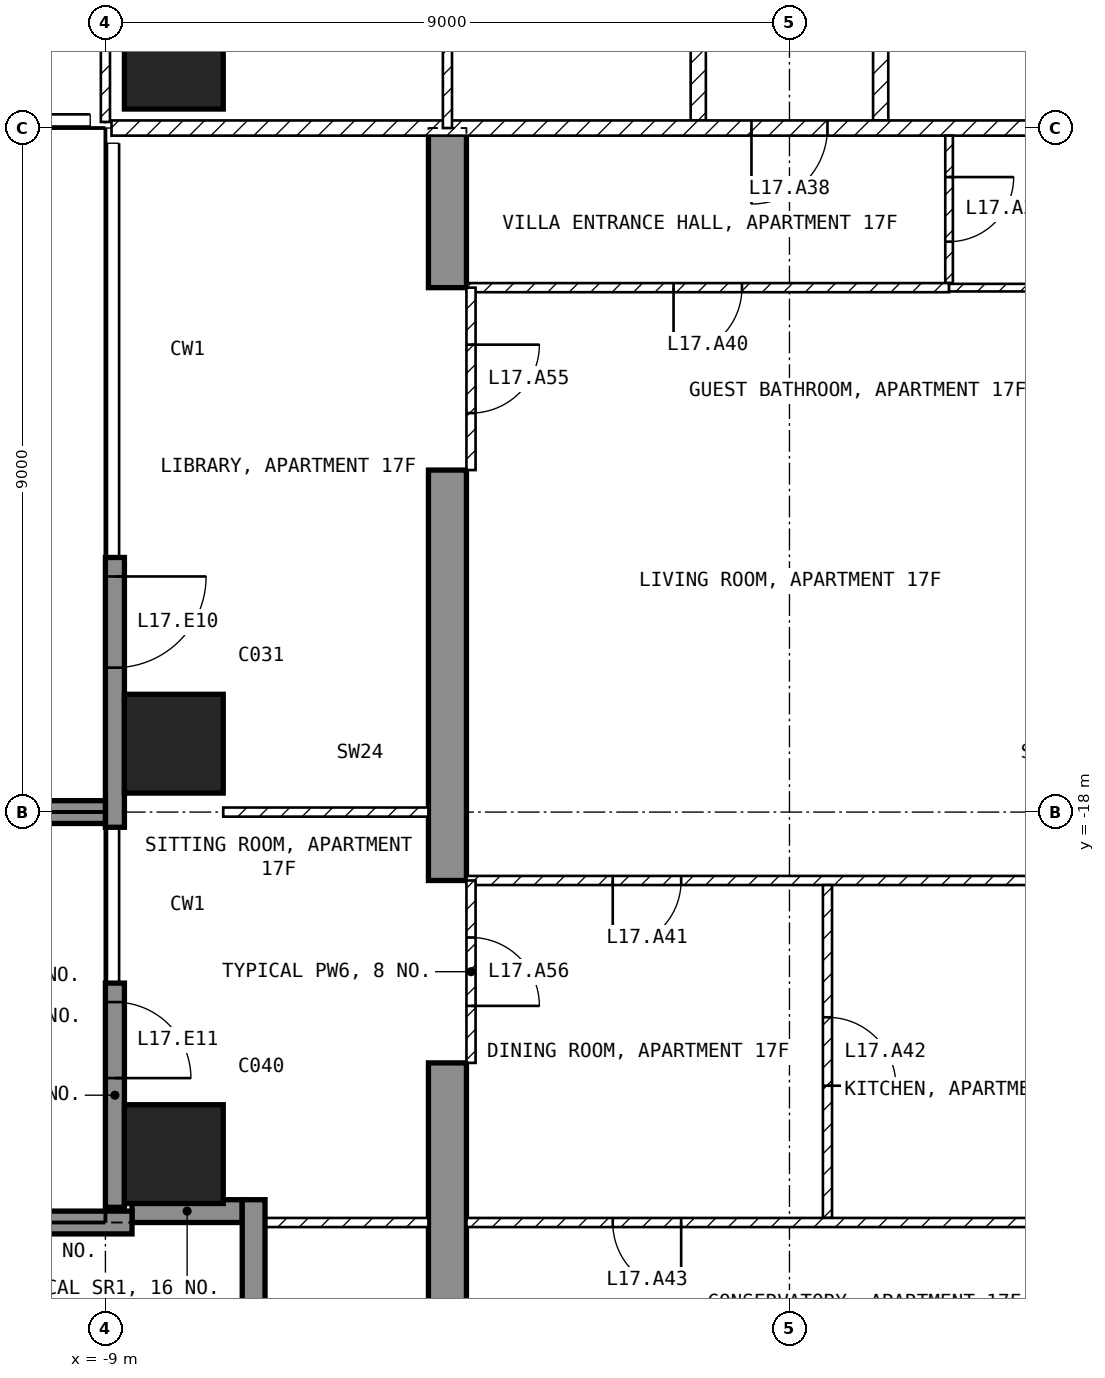
"""IFC4 building model, lengths in metres.
Left out: names, types, materials, properties, quantities, classifications, styles, units other than length and angle.
Written with IfcOpenShell. Run it as: python <this file> out.ifc"""

import sys

from ifc_helpers import new_model, si_unit, direction, frame, frame_2d, origin, origin_2d, place, context, subcontext, project, spatial, polyline, rectangle, outline, extrude, element, fill, save


model = new_model("IFC4")
c1 = context("Model", 3, precision=1e-05, world=origin(), true_north=direction((0.0, 1.0)))
c2 = subcontext(c1, "Body", "Model", "MODEL_VIEW")
j1 = project(units=[si_unit("LENGTHUNIT", "METRE"), si_unit("PLANEANGLEUNIT", "RADIAN")], contexts=[c1])
p1 = place(None, origin())
s1 = spatial("IfcSite", under=j1, at=p1, CompositionType="ELEMENT")
p2 = place(p1, origin())
s2 = spatial("IfcBuilding", under=s1, at=p2, CompositionType="ELEMENT")
p3 = place(p2, frame((0.0, 0.0, 78.5)))
s3 = spatial("IfcBuildingStorey", under=s2, at=p3, CompositionType="ELEMENT", Elevation=78.5)
for number, where, z_axis, x_axis in (
    (1, (-8.1, -22.5, -0.25), (0.0, 0.0, 1.0), (1.0, 0.0, 0.0)),
    (2, (-8.1, -17.1, -0.25), (0.0, 0.0, 1.0), (1.0, 0.0, 0.0)),
    (3, (-8.1, -8.1, -0.25), (0.0, 0.0, 1.0), (1.0, 0.0, 0.0)),
):
    element("IfcColumn", number, at=place(p3, frame(where, z_axis=z_axis, x_axis=x_axis)), inside=s3, PredefinedType="COLUMN", context=c2, shape_type="SweptSolid", body=[
        extrude(rectangle(XDim=1.3, YDim=1.3, at=origin_2d()), origin(), (0.0, 0.0, 1.0), 3.5),
    ])
p4 = place(p3, frame((-4.75, -25.45, -0.25), z_axis=(1.0, 0.0, 0.0), x_axis=(0.0, 1.0, 0.0)))
e4 = element("IfcWall", 4, at=p4, inside=s3, PredefinedType="SHEAR", context=c2, shape_type="SweptSolid", body=[
    extrude(outline(polyline([(0.0, 0.0), (4.15, 0.0), (4.15, 2.65), (6.55, 2.65), (6.55, 0.0), (11.95, 0.0), (11.95, 2.65), (14.35, 2.65), (14.35, 0.0), (16.45, 0.0), (16.45, 3.5), (0.0, 3.5), (0.0, 0.0)])), origin(), (0.0, 0.0, 1.0), 0.5),
])
p5 = place(p3, frame((-8.875, -14.65, 0.0), z_axis=(0.0, 0.0, 1.0), x_axis=(0.0, -1.0, 0.0)))
e5 = element("IfcWall", 5, at=p5, inside=s3, PredefinedType="SOLIDWALL", context=c2, shape_type="SweptSolid", body=[
    extrude(rectangle(XDim=3.55, YDim=0.25, at=frame_2d((1.775, 0.0))), origin(), (0.0, 0.0, 1.0), 3.25),
])
p6 = place(p5, frame((0.25, 0.0, 0.0)))
e6 = element("IfcOpeningElement", 6, at=p6, cuts=e5, PredefinedType="OPENING", context=c2, shape_type="SweptSolid", body=[
    extrude(rectangle(XDim=1.2, YDim=2.4, at=frame_2d((0.6, 1.2))), frame((0.0, 0.135, 0.0), z_axis=(0.0, -1.0, 0.0), x_axis=(1.0, 0.0, 0.0)), (0.0, 0.0, 1.0), 0.27),
])
p7 = place(p3, frame((-8.875, -20.25, 0.0), z_axis=(0.0, 0.0, 1.0), x_axis=(0.0, -1.0, 0.0)))
e7 = element("IfcWall", 7, at=p7, inside=s3, PredefinedType="SOLIDWALL", context=c2, shape_type="SweptSolid", body=[
    extrude(rectangle(XDim=2.95, YDim=0.25, at=frame_2d((1.475, 0.0))), origin(), (0.0, 0.0, 1.0), 3.25),
])
p8 = place(p7, frame((0.25, 0.0, 0.0)))
e8 = element("IfcOpeningElement", 8, at=p8, cuts=e7, PredefinedType="OPENING", context=c2, shape_type="SweptSolid", body=[
    extrude(rectangle(XDim=1.0, YDim=2.4, at=frame_2d((0.5, 1.2))), frame((0.0, 0.135, 0.0), z_axis=(0.0, -1.0, 0.0), x_axis=(1.0, 0.0, 0.0)), (0.0, 0.0, 1.0), 0.27),
])
p9 = place(p3, frame((-8.65, -23.25, 0.0), z_axis=(0.0, 0.0, 1.0), x_axis=(1.0, 0.0, 0.0)))
e9 = element("IfcWall", 9, at=p9, inside=s3, PredefinedType="SOLIDWALL", context=c2, shape_type="SweptSolid", body=[
    extrude(rectangle(XDim=1.45, YDim=0.3, at=frame_2d((0.725, 0.0))), origin(), (0.0, 0.0, 1.0), 3.25),
])
p10 = place(p3, frame((-7.05, -23.1, 0.0), z_axis=(0.0, 0.0, 1.0), x_axis=(0.0, -1.0, 0.0)))
e10 = element("IfcWall", 10, at=p10, inside=s3, PredefinedType="SOLIDWALL", context=c2, shape_type="SweptSolid", body=[
    extrude(rectangle(XDim=1.8, YDim=0.3, at=frame_2d((0.9, 0.0))), origin(), (0.0, 0.0, 1.0), 3.25),
])
p11 = place(p3, frame((-8.65, -23.4, 0.0), z_axis=(0.0, 0.0, 1.0), x_axis=(-1.0, 0.0, 0.0)))
e11 = element("IfcWall", 11, at=p11, inside=s3, PredefinedType="SOLIDWALL", context=c2, shape_type="SweptSolid", body=[
    extrude(rectangle(XDim=3.05, YDim=0.3, at=frame_2d((1.525, 0.0))), origin(), (0.0, 0.0, 1.0), 3.25),
])
p12 = place(p3, frame((-9.0, -18.0, 0.0), z_axis=(0.0, 0.0, 1.0), x_axis=(-1.0, 0.0, 0.0)))
e12 = element("IfcWall", 12, at=p12, inside=s3, PredefinedType="SOLIDWALL", context=c2, shape_type="SweptSolid", body=[
    extrude(rectangle(XDim=2.7, YDim=0.3, at=frame_2d((1.35, 0.0))), origin(), (0.0, 0.0, 1.0), 3.25),
])
for number, where, z_axis, x_axis in (
    (13, (1.2, -1.3, 0.0), (0.0, 0.0, 1.0), (0.0, -1.0, 0.0)),
    (14, (-1.2, -8.9, 0.0), (0.0, 0.0, 1.0), (0.0, 1.0, 0.0)),
):
    element("IfcWall", number, at=place(p3, frame(where, z_axis=z_axis, x_axis=x_axis)), inside=s3, PredefinedType="PARTITIONING", context=c2, shape_type="SweptSolid", body=[
        extrude(rectangle(XDim=7.6, YDim=0.2, at=frame_2d((3.8, 0.0))), origin(), (0.0, 0.0, 1.0), 3.25),
    ])
p13 = place(p3, frame((8.92, -9.0, 0.0), z_axis=(0.0, 0.0, 1.0), x_axis=(-1.0, 0.0, 0.0)))
e15 = element("IfcWall", 15, at=p13, inside=s3, PredefinedType="PARTITIONING", context=c2, shape_type="SweptSolid", body=[
    extrude(rectangle(XDim=17.84, YDim=0.2, at=frame_2d((8.92, 0.0))), origin(), (0.0, 0.0, 1.0), 3.25),
])
p14 = place(p13, frame((8.42, 0.0, 0.0)))
e16 = element("IfcOpeningElement", 16, at=p14, cuts=e15, PredefinedType="OPENING", context=c2, shape_type="SweptSolid", body=[
    extrude(rectangle(XDim=1.0, YDim=2.1, at=frame_2d((0.5, 1.05))), frame((0.0, 0.11, 0.0), z_axis=(0.0, -1.0, 0.0), x_axis=(1.0, 0.0, 0.0)), (0.0, 0.0, 1.0), 0.22),
])
p15 = place(p3, frame((-9.0, -1.3, 0.0), z_axis=(0.0, 0.0, 1.0), x_axis=(0.0, -1.0, 0.0)))
e17 = element("IfcWall", 17, at=p15, inside=s3, PredefinedType="PARTITIONING", context=c2, shape_type="SweptSolid", body=[
    extrude(rectangle(XDim=7.62, YDim=0.12, at=frame_2d((3.81, 0.0))), origin(), (0.0, 0.0, 1.0), 3.25),
])
p16 = place(p15, frame((4.05, 0.0, 0.0)))
e18 = element("IfcOpeningElement", 18, at=p16, cuts=e17, PredefinedType="OPENING", context=c2, shape_type="SweptSolid", body=[
    extrude(rectangle(XDim=0.9, YDim=2.1, at=frame_2d((0.45, 1.05))), frame((0.0, 0.07, 0.0), z_axis=(0.0, -1.0, 0.0), x_axis=(1.0, 0.0, 0.0)), (0.0, 0.0, 1.0), 0.14),
])
p17 = place(p3, frame((-4.5, -1.3, 0.0), z_axis=(0.0, 0.0, 1.0), x_axis=(0.0, -1.0, 0.0)))
e19 = element("IfcWall", 19, at=p17, inside=s3, PredefinedType="PARTITIONING", context=c2, shape_type="SweptSolid", body=[
    extrude(rectangle(XDim=7.7, YDim=0.12, at=frame_2d((3.85, 0.0))), origin(), (0.0, 0.0, 1.0), 3.25),
])
p18 = place(p17, frame((3.4, 0.0, 0.0)))
e20 = element("IfcOpeningElement", 20, at=p18, cuts=e19, PredefinedType="OPENING", context=c2, shape_type="SweptSolid", body=[
    extrude(rectangle(XDim=0.9, YDim=2.1, at=frame_2d((0.45, 1.05))), frame((0.0, 0.07, 0.0), z_axis=(0.0, -1.0, 0.0), x_axis=(1.0, 0.0, 0.0)), (0.0, 0.0, 1.0), 0.14),
])
p19 = place(p3, frame((2.1, -9.1, 0.0), z_axis=(0.0, 0.0, 1.0), x_axis=(0.0, -1.0, 0.0)))
e21 = element("IfcWall", 21, at=p19, inside=s3, PredefinedType="PARTITIONING", context=c2, shape_type="SweptSolid", body=[
    extrude(rectangle(XDim=1.94, YDim=0.1, at=frame_2d((0.97, 0.0))), origin(), (0.0, 0.0, 1.0), 3.25),
])
p20 = place(p19, frame((0.545, 0.0, 0.0)))
e22 = element("IfcOpeningElement", 22, at=p20, cuts=e21, PredefinedType="OPENING", context=c2, shape_type="SweptSolid", body=[
    extrude(rectangle(XDim=0.85, YDim=2.1, at=frame_2d((0.425, 1.05))), frame((0.0, 0.06, 0.0), z_axis=(0.0, -1.0, 0.0), x_axis=(1.0, 0.0, 0.0)), (0.0, 0.0, 1.0), 0.12),
])
p21 = place(p3, frame((2.1, -11.1, 0.0), z_axis=(0.0, 0.0, 1.0), x_axis=(-1.0, 0.0, 0.0)))
e23 = element("IfcWall", 23, at=p21, inside=s3, PredefinedType="PARTITIONING", context=c2, shape_type="SweptSolid", body=[
    extrude(rectangle(XDim=6.35, YDim=0.12, at=frame_2d((3.175, 0.0))), origin(), (0.0, 0.0, 1.0), 3.25),
])
p22 = place(p21, frame((2.725, 0.0, 0.0)))
e24 = element("IfcOpeningElement", 24, at=p22, cuts=e23, PredefinedType="OPENING", context=c2, shape_type="SweptSolid", body=[
    extrude(rectangle(XDim=0.9, YDim=2.1, at=frame_2d((0.45, 1.05))), frame((0.0, 0.07, 0.0), z_axis=(0.0, -1.0, 0.0), x_axis=(1.0, 0.0, 0.0)), (0.0, 0.0, 1.0), 0.14),
])
p23 = place(p3, frame((4.25, -11.1, 0.0), z_axis=(0.0, 0.0, 1.0), x_axis=(-1.0, 0.0, 0.0)))
e25 = element("IfcWall", 25, at=p23, inside=s3, PredefinedType="PARTITIONING", context=c2, shape_type="SweptSolid", body=[
    extrude(rectangle(XDim=2.15, YDim=0.1, at=frame_2d((1.075, 0.0))), origin(), (0.0, 0.0, 1.0), 3.25),
])
p24 = place(p3, frame((4.25, -18.9, 0.0), z_axis=(0.0, 0.0, 1.0), x_axis=(-1.0, 0.0, 0.0)))
e26 = element("IfcWall", 26, at=p24, inside=s3, PredefinedType="PARTITIONING", context=c2, shape_type="SweptSolid", body=[
    extrude(rectangle(XDim=8.5, YDim=0.12, at=frame_2d((4.25, 0.0))), origin(), (0.0, 0.0, 1.0), 3.25),
])
p25 = place(p24, frame((5.675, 0.0, 0.0)))
e27 = element("IfcOpeningElement", 27, at=p25, cuts=e26, PredefinedType="OPENING", context=c2, shape_type="SweptSolid", body=[
    extrude(rectangle(XDim=0.9, YDim=2.1, at=frame_2d((0.45, 1.05))), frame((0.0, 0.07, 0.0), z_axis=(0.0, -1.0, 0.0), x_axis=(1.0, 0.0, 0.0)), (0.0, 0.0, 1.0), 0.14),
])
p26 = place(p3, frame((0.5, -18.96, 0.0), z_axis=(0.0, 0.0, 1.0), x_axis=(0.0, -1.0, 0.0)))
e28 = element("IfcWall", 28, at=p26, inside=s3, PredefinedType="PARTITIONING", context=c2, shape_type="SweptSolid", body=[
    extrude(rectangle(XDim=4.38, YDim=0.12, at=frame_2d((2.19, 0.0))), origin(), (0.0, 0.0, 1.0), 3.25),
])
p27 = place(p26, frame((1.74, 0.0, 0.0)))
e29 = element("IfcOpeningElement", 29, at=p27, cuts=e28, PredefinedType="OPENING", context=c2, shape_type="SweptSolid", body=[
    extrude(rectangle(XDim=0.9, YDim=2.1, at=frame_2d((0.45, 1.05))), frame((0.0, 0.07, 0.0), z_axis=(0.0, -1.0, 0.0), x_axis=(1.0, 0.0, 0.0)), (0.0, 0.0, 1.0), 0.14),
])
p28 = place(p3, frame((4.25, -23.4, 0.0), z_axis=(0.0, 0.0, 1.0), x_axis=(-1.0, 0.0, 0.0)))
e30 = element("IfcWall", 30, at=p28, inside=s3, PredefinedType="PARTITIONING", context=c2, shape_type="SweptSolid", body=[
    extrude(rectangle(XDim=8.5, YDim=0.12, at=frame_2d((4.25, 0.0))), origin(), (0.0, 0.0, 1.0), 3.25),
])
p29 = place(p28, frame((5.675, 0.0, 0.0)))
e31 = element("IfcOpeningElement", 31, at=p29, cuts=e30, PredefinedType="OPENING", context=c2, shape_type="SweptSolid", body=[
    extrude(rectangle(XDim=0.9, YDim=2.1, at=frame_2d((0.45, 1.05))), frame((0.0, 0.07, 0.0), z_axis=(0.0, -1.0, 0.0), x_axis=(1.0, 0.0, 0.0)), (0.0, 0.0, 1.0), 0.14),
])
p30 = place(p3, frame((-4.75, -18.0, 0.0), z_axis=(0.0, 0.0, 1.0), x_axis=(-1.0, 0.0, 0.0)))
e32 = element("IfcWall", 32, at=p30, inside=s3, PredefinedType="PARTITIONING", context=c2, shape_type="SweptSolid", body=[
    extrude(rectangle(XDim=2.7, YDim=0.12, at=frame_2d((1.35, 0.0))), origin(), (0.0, 0.0, 1.0), 3.25),
])
p31 = place(p3, frame((-4.75, -23.4, 0.0), z_axis=(0.0, 0.0, 1.0), x_axis=(-1.0, 0.0, 0.0)))
e33 = element("IfcWall", 33, at=p31, inside=s3, PredefinedType="PARTITIONING", context=c2, shape_type="SweptSolid", body=[
    extrude(rectangle(XDim=2.37, YDim=0.12, at=frame_2d((1.185, 0.0))), origin(), (0.0, 0.0, 1.0), 3.25),
])
p32 = place(p3, frame((-4.19, -11.1, 0.0), z_axis=(0.0, 0.0, 1.0), x_axis=(0.0, -1.0, 0.0)))
e34 = element("IfcWall", 34, at=p32, inside=s3, PredefinedType="PARTITIONING", context=c2, shape_type="SweptSolid", body=[
    extrude(rectangle(XDim=2.4, YDim=0.12, at=frame_2d((1.2, 0.0))), origin(), (0.0, 0.0, 1.0), 2.4),
])
p33 = place(p32, frame((0.75, 0.0, 0.0)))
e35 = element("IfcOpeningElement", 35, at=p33, cuts=e34, PredefinedType="OPENING", context=c2, shape_type="SweptSolid", body=[
    extrude(rectangle(XDim=0.9, YDim=2.1, at=frame_2d((0.45, 1.05))), frame((0.0, 0.07, 0.0), z_axis=(0.0, -1.0, 0.0), x_axis=(1.0, 0.0, 0.0)), (0.0, 0.0, 1.0), 0.14),
])
p34 = place(p3, frame((-4.19, -18.9, 0.0), z_axis=(0.0, 0.0, 1.0), x_axis=(0.0, -1.0, 0.0)))
e36 = element("IfcWall", 36, at=p34, inside=s3, PredefinedType="PARTITIONING", context=c2, shape_type="SweptSolid", body=[
    extrude(rectangle(XDim=2.4, YDim=0.12, at=frame_2d((1.2, 0.0))), origin(), (0.0, 0.0, 1.0), 2.4),
])
p35 = place(p34, frame((0.75, 0.0, 0.0)))
e37 = element("IfcOpeningElement", 37, at=p35, cuts=e36, PredefinedType="OPENING", context=c2, shape_type="SweptSolid", body=[
    extrude(rectangle(XDim=0.9, YDim=2.1, at=frame_2d((0.45, 1.05))), frame((0.0, 0.07, 0.0), z_axis=(0.0, -1.0, 0.0), x_axis=(1.0, 0.0, 0.0)), (0.0, 0.0, 1.0), 0.14),
])
p36 = place(p6, origin())
e38 = element("IfcDoor", 38, at=p36, inside=s3, OperationType="SINGLE_SWING_LEFT", PredefinedType="DOOR", context=c2, shape_type="SweptSolid", body=[
    extrude(rectangle(XDim=1.2, YDim=2.4, at=frame_2d((0.6, 1.2))), frame((0.0, 0.025, 0.0), z_axis=(0.0, -1.0, 0.0), x_axis=(1.0, 0.0, 0.0)), (0.0, 0.0, 1.0), 0.05),
])
fill(e6, e38)
p37 = place(p8, origin())
e39 = element("IfcDoor", 39, at=p37, inside=s3, OperationType="SINGLE_SWING_RIGHT", PredefinedType="DOOR", context=c2, shape_type="SweptSolid", body=[
    extrude(rectangle(XDim=1.0, YDim=2.4, at=frame_2d((0.5, 1.2))), frame((0.0, 0.025, 0.0), z_axis=(0.0, -1.0, 0.0), x_axis=(1.0, 0.0, 0.0)), (0.0, 0.0, 1.0), 0.05),
])
fill(e8, e39)
p38 = place(p14, origin())
e40 = element("IfcDoor", 40, at=p38, inside=s3, OperationType="SINGLE_SWING_RIGHT", PredefinedType="DOOR", context=c2, shape_type="SweptSolid", body=[
    extrude(rectangle(XDim=1.0, YDim=2.1, at=frame_2d((0.5, 1.05))), frame((0.0, 0.025, 0.0), z_axis=(0.0, -1.0, 0.0), x_axis=(1.0, 0.0, 0.0)), (0.0, 0.0, 1.0), 0.05),
])
fill(e16, e40)
p39 = place(p20, origin())
e41 = element("IfcDoor", 41, at=p39, inside=s3, OperationType="SINGLE_SWING_LEFT", PredefinedType="DOOR", context=c2, shape_type="SweptSolid", body=[
    extrude(rectangle(XDim=0.85, YDim=2.1, at=frame_2d((0.425, 1.05))), frame((0.0, 0.025, 0.0), z_axis=(0.0, -1.0, 0.0), x_axis=(1.0, 0.0, 0.0)), (0.0, 0.0, 1.0), 0.05),
])
fill(e22, e41)
p40 = place(p22, origin())
e42 = element("IfcDoor", 42, at=p40, inside=s3, OperationType="SINGLE_SWING_RIGHT", PredefinedType="DOOR", context=c2, shape_type="SweptSolid", body=[
    extrude(rectangle(XDim=0.9, YDim=2.1, at=frame_2d((0.45, 1.05))), frame((0.0, 0.025, 0.0), z_axis=(0.0, -1.0, 0.0), x_axis=(1.0, 0.0, 0.0)), (0.0, 0.0, 1.0), 0.05),
])
fill(e24, e42)
p41 = place(p25, origin())
e43 = element("IfcDoor", 43, at=p41, inside=s3, OperationType="SINGLE_SWING_RIGHT", PredefinedType="DOOR", context=c2, shape_type="SweptSolid", body=[
    extrude(rectangle(XDim=0.9, YDim=2.1, at=frame_2d((0.45, 1.05))), frame((0.0, 0.025, 0.0), z_axis=(0.0, -1.0, 0.0), x_axis=(1.0, 0.0, 0.0)), (0.0, 0.0, 1.0), 0.05),
])
fill(e27, e43)
p42 = place(p27, origin())
e44 = element("IfcDoor", 44, at=p42, inside=s3, OperationType="SINGLE_SWING_RIGHT", PredefinedType="DOOR", context=c2, shape_type="SweptSolid", body=[
    extrude(rectangle(XDim=0.9, YDim=2.1, at=frame_2d((0.45, 1.05))), frame((0.0, 0.025, 0.0), z_axis=(0.0, -1.0, 0.0), x_axis=(1.0, 0.0, 0.0)), (0.0, 0.0, 1.0), 0.05),
])
fill(e29, e44)
p43 = place(p29, origin())
e45 = element("IfcDoor", 45, at=p43, inside=s3, OperationType="SINGLE_SWING_LEFT", PredefinedType="DOOR", context=c2, shape_type="SweptSolid", body=[
    extrude(rectangle(XDim=0.9, YDim=2.1, at=frame_2d((0.45, 1.05))), frame((0.0, 0.025, 0.0), z_axis=(0.0, -1.0, 0.0), x_axis=(1.0, 0.0, 0.0)), (0.0, 0.0, 1.0), 0.05),
])
fill(e31, e45)
p44 = place(p33, origin())
e46 = element("IfcDoor", 46, at=p44, inside=s3, OperationType="SINGLE_SWING_LEFT", PredefinedType="DOOR", context=c2, shape_type="SweptSolid", body=[
    extrude(rectangle(XDim=0.9, YDim=2.1, at=frame_2d((0.45, 1.05))), frame((0.0, 0.025, 0.0), z_axis=(0.0, -1.0, 0.0), x_axis=(1.0, 0.0, 0.0)), (0.0, 0.0, 1.0), 0.05),
])
fill(e35, e46)
p45 = place(p35, origin())
e47 = element("IfcDoor", 47, at=p45, inside=s3, OperationType="SINGLE_SWING_RIGHT", PredefinedType="DOOR", context=c2, shape_type="SweptSolid", body=[
    extrude(rectangle(XDim=0.9, YDim=2.1, at=frame_2d((0.45, 1.05))), frame((0.0, 0.025, 0.0), z_axis=(0.0, -1.0, 0.0), x_axis=(1.0, 0.0, 0.0)), (0.0, 0.0, 1.0), 0.05),
])
fill(e37, e47)
save(model, sys.argv[1])
